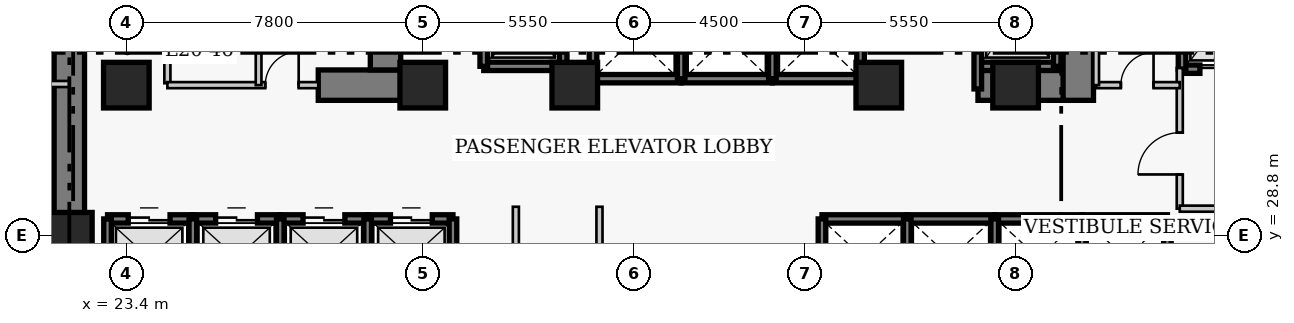
"""IFC4 building model, lengths in metres.
Left out: names, types, materials, properties, quantities, classifications, styles, units other than length and angle.
Written with IfcOpenShell. Run it as: python <this file> out.ifc"""

import sys

from ifc_helpers import new_model, si_unit, direction, frame, frame_2d, origin, origin_2d, place, context, subcontext, project, spatial, rectangle, extrude, element, fill, save


model = new_model("IFC4")
c1 = context("Model", 3, precision=1e-05, world=origin(), true_north=direction((0.0, 1.0)))
c2 = subcontext(c1, "Body", "Model", "MODEL_VIEW")
j1 = project(units=[si_unit("LENGTHUNIT", "METRE"), si_unit("PLANEANGLEUNIT", "RADIAN")], contexts=[c1])
p1 = place(None, origin())
s1 = spatial("IfcSite", under=j1, at=p1, CompositionType="ELEMENT")
p2 = place(p1, origin())
s2 = spatial("IfcBuilding", under=s1, at=p2, CompositionType="ELEMENT")
p3 = place(p2, frame((0.0, 0.0, 84.2)))
s3 = spatial("IfcBuildingStorey", under=s2, at=p3, CompositionType="ELEMENT", Elevation=84.2)
p4 = place(p3, frame((21.9, 27.05, 0.0), z_axis=(0.0, 0.0, 1.0), x_axis=(0.0, 1.0, 0.0)))
e1 = element("IfcWall", 1, at=p4, inside=s3, PredefinedType="SHEAR", context=c2, shape_type="SweptSolid", body=[
    extrude(rectangle(XDim=13.67, YDim=0.8, at=frame_2d((6.835, 0.0))), origin(), (0.0, 0.0, 1.0), 3.8),
])
p5 = place(p3, frame((28.45, 32.75, 0.0), z_axis=(0.0, 0.0, 1.0), x_axis=(1.0, 0.0, 0.0)))
e2 = element("IfcWall", 2, at=p5, inside=s3, PredefinedType="SHEAR", context=c2, shape_type="SweptSolid", body=[
    extrude(rectangle(XDim=2.4, YDim=0.8, at=frame_2d((1.2, 0.0))), origin(), (0.0, 0.0, 1.0), 3.8),
])
p6 = place(p3, frame((45.81, 32.75, 0.0), z_axis=(0.0, 0.0, 1.0), x_axis=(1.0, 0.0, 0.0)))
e3 = element("IfcWall", 3, at=p6, inside=s3, PredefinedType="SHEAR", context=c2, shape_type="SweptSolid", body=[
    extrude(rectangle(XDim=2.64, YDim=0.8, at=frame_2d((1.32, 0.0))), origin(), (0.0, 0.0, 1.0), 3.8),
])
p7 = place(p3, frame((30.22, 33.15, 0.0), z_axis=(0.0, 0.0, 1.0), x_axis=(0.0, 1.0, 0.0)))
e4 = element("IfcWall", 4, at=p7, inside=s3, PredefinedType="SHEAR", context=c2, shape_type="SweptSolid", body=[
    extrude(rectangle(XDim=7.17, YDim=0.8, at=frame_2d((3.585, 0.0))), origin(), (0.0, 0.0, 1.0), 3.8),
])
p8 = place(p3, frame((48.45, 32.35, 0.0), z_axis=(0.0, 0.0, 1.0), x_axis=(0.0, 1.0, 0.0)))
e5 = element("IfcWall", 5, at=p8, inside=s3, PredefinedType="SHEAR", context=c2, shape_type="SweptSolid", body=[
    extrude(rectangle(XDim=7.97, YDim=0.8, at=frame_2d((3.985, 0.0))), origin(), (0.0, 0.0, 1.0), 3.8),
])
p9 = place(p8, frame((5.85, 0.0, 0.0)))
e6 = element("IfcOpeningElement", 6, at=p9, cuts=e5, PredefinedType="OPENING", context=c2, shape_type="SweptSolid", body=[
    extrude(rectangle(XDim=1.1, YDim=2.15, at=frame_2d((0.55, 1.075))), frame((0.0, 0.41, 0.0), z_axis=(0.0, -1.0, 0.0), x_axis=(1.0, 0.0, 0.0)), (0.0, 0.0, 1.0), 0.82),
])
for number, where, z_axis, x_axis in (
    (7, (21.9, 28.8, 0.0), (0.0, 0.0, 1.0), (1.0, 0.0, 0.0)),
    (8, (23.4, 32.75, 0.0), (0.0, 0.0, 1.0), (1.0, 0.0, 0.0)),
    (9, (31.2, 32.75, 0.0), (0.0, 0.0, 1.0), (1.0, 0.0, 0.0)),
    (10, (35.2, 32.75, 0.0), (0.0, 0.0, 1.0), (1.0, 0.0, 0.0)),
    (11, (43.2, 32.75, 0.0), (0.0, 0.0, 1.0), (1.0, 0.0, 0.0)),
    (12, (46.8, 32.75, 0.0), (0.0, 0.0, 1.0), (1.0, 0.0, 0.0)),
):
    element("IfcColumn", number, at=place(p3, frame(where, z_axis=z_axis, x_axis=x_axis)), inside=s3, PredefinedType="COLUMN", context=c2, shape_type="SweptSolid", body=[
        extrude(rectangle(XDim=1.2, YDim=1.2, at=origin_2d()), origin(), (0.0, 0.0, 1.0), 3.8),
    ])
p10 = place(p3, frame((22.905, 29.23, 0.0), z_axis=(0.0, 0.0, 1.0), x_axis=(1.0, 0.0, 0.0)))
e13 = element("IfcWall", 13, at=p10, inside=s3, PredefinedType="SHEAR", context=c2, shape_type="SweptSolid", body=[
    extrude(rectangle(XDim=2.245, YDim=0.22, at=frame_2d((1.123, 0.0))), origin(), (0.0, 0.0, 1.0), 3.8),
])
p11 = place(p10, frame((0.545, 0.0, 0.0)))
e14 = element("IfcOpeningElement", 14, at=p11, cuts=e13, PredefinedType="OPENING", context=c2, shape_type="SweptSolid", body=[
    extrude(rectangle(XDim=1.1, YDim=2.15, at=frame_2d((0.55, 1.075))), frame((0.0, 0.12, 0.0), z_axis=(0.0, -1.0, 0.0), x_axis=(1.0, 0.0, 0.0)), (0.0, 0.0, 1.0), 0.24),
])
p12 = place(p3, frame((22.905, 27.17, 0.0), z_axis=(0.0, 0.0, 1.0), x_axis=(0.0, 1.0, 0.0)))
e15 = element("IfcWall", 15, at=p12, inside=s3, PredefinedType="SHEAR", context=c2, shape_type="SweptSolid", body=[
    extrude(rectangle(XDim=2.06, YDim=0.2, at=frame_2d((1.03, 0.0))), origin(), (0.0, 0.0, 1.0), 3.8),
])
p13 = place(p3, frame((25.15, 29.23, 0.0), z_axis=(0.0, 0.0, 1.0), x_axis=(1.0, 0.0, 0.0)))
e16 = element("IfcWall", 16, at=p13, inside=s3, PredefinedType="SHEAR", context=c2, shape_type="SweptSolid", body=[
    extrude(rectangle(XDim=2.3, YDim=0.22, at=frame_2d((1.15, 0.0))), origin(), (0.0, 0.0, 1.0), 3.8),
])
p14 = place(p13, frame((0.6, 0.0, 0.0)))
e17 = element("IfcOpeningElement", 17, at=p14, cuts=e16, PredefinedType="OPENING", context=c2, shape_type="SweptSolid", body=[
    extrude(rectangle(XDim=1.1, YDim=2.15, at=frame_2d((0.55, 1.075))), frame((0.0, 0.12, 0.0), z_axis=(0.0, -1.0, 0.0), x_axis=(1.0, 0.0, 0.0)), (0.0, 0.0, 1.0), 0.24),
])
p15 = place(p3, frame((25.15, 27.17, 0.0), z_axis=(0.0, 0.0, 1.0), x_axis=(0.0, 1.0, 0.0)))
e18 = element("IfcWall", 18, at=p15, inside=s3, PredefinedType="SHEAR", context=c2, shape_type="SweptSolid", body=[
    extrude(rectangle(XDim=2.06, YDim=0.2, at=frame_2d((1.03, 0.0))), origin(), (0.0, 0.0, 1.0), 3.8),
])
p16 = place(p3, frame((27.45, 29.23, 0.0), z_axis=(0.0, 0.0, 1.0), x_axis=(1.0, 0.0, 0.0)))
e19 = element("IfcWall", 19, at=p16, inside=s3, PredefinedType="SHEAR", context=c2, shape_type="SweptSolid", body=[
    extrude(rectangle(XDim=2.3, YDim=0.22, at=frame_2d((1.15, 0.0))), origin(), (0.0, 0.0, 1.0), 3.8),
])
p17 = place(p16, frame((0.6, 0.0, 0.0)))
e20 = element("IfcOpeningElement", 20, at=p17, cuts=e19, PredefinedType="OPENING", context=c2, shape_type="SweptSolid", body=[
    extrude(rectangle(XDim=1.1, YDim=2.15, at=frame_2d((0.55, 1.075))), frame((0.0, 0.12, 0.0), z_axis=(0.0, -1.0, 0.0), x_axis=(1.0, 0.0, 0.0)), (0.0, 0.0, 1.0), 0.24),
])
p18 = place(p3, frame((27.45, 27.17, 0.0), z_axis=(0.0, 0.0, 1.0), x_axis=(0.0, 1.0, 0.0)))
e21 = element("IfcWall", 21, at=p18, inside=s3, PredefinedType="SHEAR", context=c2, shape_type="SweptSolid", body=[
    extrude(rectangle(XDim=2.06, YDim=0.2, at=frame_2d((1.03, 0.0))), origin(), (0.0, 0.0, 1.0), 3.8),
])
p19 = place(p3, frame((29.75, 29.23, 0.0), z_axis=(0.0, 0.0, 1.0), x_axis=(1.0, 0.0, 0.0)))
e22 = element("IfcWall", 22, at=p19, inside=s3, PredefinedType="SHEAR", context=c2, shape_type="SweptSolid", body=[
    extrude(rectangle(XDim=2.245, YDim=0.22, at=frame_2d((1.123, 0.0))), origin(), (0.0, 0.0, 1.0), 3.8),
])
p20 = place(p19, frame((0.6, 0.0, 0.0)))
e23 = element("IfcOpeningElement", 23, at=p20, cuts=e22, PredefinedType="OPENING", context=c2, shape_type="SweptSolid", body=[
    extrude(rectangle(XDim=1.1, YDim=2.15, at=frame_2d((0.55, 1.075))), frame((0.0, 0.12, 0.0), z_axis=(0.0, -1.0, 0.0), x_axis=(1.0, 0.0, 0.0)), (0.0, 0.0, 1.0), 0.24),
])
for number, where, z_axis, x_axis in (
    (24, (29.75, 27.17, 0.0), (0.0, 0.0, 1.0), (0.0, 1.0, 0.0)),
    (25, (31.995, 27.17, 0.0), (0.0, 0.0, 1.0), (0.0, 1.0, 0.0)),
):
    element("IfcWall", number, at=place(p3, frame(where, z_axis=z_axis, x_axis=x_axis)), inside=s3, PredefinedType="SHEAR", context=c2, shape_type="SweptSolid", body=[
        extrude(rectangle(XDim=2.06, YDim=0.2, at=frame_2d((1.03, 0.0))), origin(), (0.0, 0.0, 1.0), 3.8),
    ])
p21 = place(p3, frame((41.705, 29.23, 0.0), z_axis=(0.0, 0.0, 1.0), x_axis=(1.0, 0.0, 0.0)))
e26 = element("IfcWall", 26, at=p21, inside=s3, PredefinedType="SHEAR", context=c2, shape_type="SweptSolid", body=[
    extrude(rectangle(XDim=2.245, YDim=0.22, at=frame_2d((1.123, 0.0))), origin(), (0.0, 0.0, 1.0), 3.8),
])
p22 = place(p3, frame((41.705, 27.17, 0.0), z_axis=(0.0, 0.0, 1.0), x_axis=(0.0, 1.0, 0.0)))
e27 = element("IfcWall", 27, at=p22, inside=s3, PredefinedType="SHEAR", context=c2, shape_type="SweptSolid", body=[
    extrude(rectangle(XDim=2.06, YDim=0.2, at=frame_2d((1.03, 0.0))), origin(), (0.0, 0.0, 1.0), 3.8),
])
p23 = place(p3, frame((43.95, 29.23, 0.0), z_axis=(0.0, 0.0, 1.0), x_axis=(1.0, 0.0, 0.0)))
e28 = element("IfcWall", 28, at=p23, inside=s3, PredefinedType="SHEAR", context=c2, shape_type="SweptSolid", body=[
    extrude(rectangle(XDim=2.3, YDim=0.22, at=frame_2d((1.15, 0.0))), origin(), (0.0, 0.0, 1.0), 3.8),
])
p24 = place(p3, frame((43.95, 27.17, 0.0), z_axis=(0.0, 0.0, 1.0), x_axis=(0.0, 1.0, 0.0)))
e29 = element("IfcWall", 29, at=p24, inside=s3, PredefinedType="SHEAR", context=c2, shape_type="SweptSolid", body=[
    extrude(rectangle(XDim=2.06, YDim=0.2, at=frame_2d((1.03, 0.0))), origin(), (0.0, 0.0, 1.0), 3.8),
])
p25 = place(p3, frame((46.25, 29.23, 0.0), z_axis=(0.0, 0.0, 1.0), x_axis=(1.0, 0.0, 0.0)))
e30 = element("IfcWall", 30, at=p25, inside=s3, PredefinedType="SHEAR", context=c2, shape_type="SweptSolid", body=[
    extrude(rectangle(XDim=2.3, YDim=0.22, at=frame_2d((1.15, 0.0))), origin(), (0.0, 0.0, 1.0), 3.8),
])
p26 = place(p3, frame((46.25, 27.17, 0.0), z_axis=(0.0, 0.0, 1.0), x_axis=(0.0, 1.0, 0.0)))
e31 = element("IfcWall", 31, at=p26, inside=s3, PredefinedType="SHEAR", context=c2, shape_type="SweptSolid", body=[
    extrude(rectangle(XDim=2.06, YDim=0.2, at=frame_2d((1.03, 0.0))), origin(), (0.0, 0.0, 1.0), 3.8),
])
p27 = place(p3, frame((48.55, 29.23, 0.0), z_axis=(0.0, 0.0, 1.0), x_axis=(1.0, 0.0, 0.0)))
e32 = element("IfcWall", 32, at=p27, inside=s3, PredefinedType="SHEAR", context=c2, shape_type="SweptSolid", body=[
    extrude(rectangle(XDim=2.245, YDim=0.22, at=frame_2d((1.123, 0.0))), origin(), (0.0, 0.0, 1.0), 3.8),
])
for number, where, z_axis, x_axis in (
    (33, (48.55, 27.17, 0.0), (0.0, 0.0, 1.0), (0.0, 1.0, 0.0)),
    (34, (50.795, 27.17, 0.0), (0.0, 0.0, 1.0), (0.0, 1.0, 0.0)),
):
    element("IfcWall", number, at=place(p3, frame(where, z_axis=z_axis, x_axis=x_axis)), inside=s3, PredefinedType="SHEAR", context=c2, shape_type="SweptSolid", body=[
        extrude(rectangle(XDim=2.06, YDim=0.2, at=frame_2d((1.03, 0.0))), origin(), (0.0, 0.0, 1.0), 3.8),
    ])
p28 = place(p3, frame((35.68, 32.92, 0.0), z_axis=(0.0, 0.0, 1.0), x_axis=(1.0, 0.0, 0.0)))
e35 = element("IfcWall", 35, at=p28, inside=s3, PredefinedType="SHEAR", context=c2, shape_type="SweptSolid", body=[
    extrude(rectangle(XDim=2.32, YDim=0.22, at=frame_2d((1.16, 0.0))), origin(), (0.0, 0.0, 1.0), 3.8),
])
p29 = place(p3, frame((35.68, 32.92, 0.0), z_axis=(0.0, 0.0, 1.0), x_axis=(0.0, 1.0, 0.0)))
e36 = element("IfcWall", 36, at=p29, inside=s3, PredefinedType="SHEAR", context=c2, shape_type="SweptSolid", body=[
    extrude(rectangle(XDim=2.16, YDim=0.2, at=frame_2d((1.08, 0.0))), origin(), (0.0, 0.0, 1.0), 3.8),
])
p30 = place(p3, frame((38.0, 32.92, 0.0), z_axis=(0.0, 0.0, 1.0), x_axis=(1.0, 0.0, 0.0)))
e37 = element("IfcWall", 37, at=p30, inside=s3, PredefinedType="SHEAR", context=c2, shape_type="SweptSolid", body=[
    extrude(rectangle(XDim=2.4, YDim=0.22, at=frame_2d((1.2, 0.0))), origin(), (0.0, 0.0, 1.0), 3.8),
])
p31 = place(p3, frame((38.0, 32.92, 0.0), z_axis=(0.0, 0.0, 1.0), x_axis=(0.0, 1.0, 0.0)))
e38 = element("IfcWall", 38, at=p31, inside=s3, PredefinedType="SHEAR", context=c2, shape_type="SweptSolid", body=[
    extrude(rectangle(XDim=2.16, YDim=0.2, at=frame_2d((1.08, 0.0))), origin(), (0.0, 0.0, 1.0), 3.8),
])
p32 = place(p3, frame((40.4, 32.92, 0.0), z_axis=(0.0, 0.0, 1.0), x_axis=(1.0, 0.0, 0.0)))
e39 = element("IfcWall", 39, at=p32, inside=s3, PredefinedType="SHEAR", context=c2, shape_type="SweptSolid", body=[
    extrude(rectangle(XDim=2.32, YDim=0.22, at=frame_2d((1.16, 0.0))), origin(), (0.0, 0.0, 1.0), 3.8),
])
for number, where, z_axis, x_axis in (
    (40, (40.4, 32.92, 0.0), (0.0, 0.0, 1.0), (0.0, 1.0, 0.0)),
    (41, (42.72, 32.92, 0.0), (0.0, 0.0, 1.0), (0.0, 1.0, 0.0)),
):
    element("IfcWall", number, at=place(p3, frame(where, z_axis=z_axis, x_axis=x_axis)), inside=s3, PredefinedType="SHEAR", context=c2, shape_type="SweptSolid", body=[
        extrude(rectangle(XDim=2.16, YDim=0.2, at=frame_2d((1.08, 0.0))), origin(), (0.0, 0.0, 1.0), 3.8),
    ])
p33 = place(p3, frame((51.18, 33.17, 0.0), z_axis=(0.0, 0.0, 1.0), x_axis=(1.0, 0.0, 0.0)))
e42 = element("IfcWall", 42, at=p33, inside=s3, PredefinedType="SHEAR", context=c2, shape_type="SweptSolid", body=[
    extrude(rectangle(XDim=2.42, YDim=0.22, at=frame_2d((1.21, 0.0))), origin(), (0.0, 0.0, 1.0), 3.8),
])
p34 = place(p33, frame((0.47, 0.0, 0.0)))
e43 = element("IfcOpeningElement", 43, at=p34, cuts=e42, PredefinedType="OPENING", context=c2, shape_type="SweptSolid", body=[
    extrude(rectangle(XDim=1.3, YDim=2.15, at=frame_2d((0.65, 1.075))), frame((0.0, 0.12, 0.0), z_axis=(0.0, -1.0, 0.0), x_axis=(1.0, 0.0, 0.0)), (0.0, 0.0, 1.0), 0.24),
])
p35 = place(p3, frame((51.18, 33.17, 0.0), z_axis=(0.0, 0.0, 1.0), x_axis=(0.0, 1.0, 0.0)))
e44 = element("IfcWall", 44, at=p35, inside=s3, PredefinedType="SHEAR", context=c2, shape_type="SweptSolid", body=[
    extrude(rectangle(XDim=2.86, YDim=0.2, at=frame_2d((1.43, 0.0))), origin(), (0.0, 0.0, 1.0), 3.8),
])
p36 = place(p3, frame((32.805, 33.245, 0.0), z_axis=(0.0, 0.0, 1.0), x_axis=(1.0, 0.0, 0.0)))
e45 = element("IfcWall", 45, at=p36, inside=s3, PredefinedType="SHEAR", context=c2, shape_type="SweptSolid", body=[
    extrude(rectangle(XDim=2.09, YDim=0.22, at=frame_2d((1.045, 0.0))), origin(), (0.0, 0.0, 1.0), 3.8),
])
for number, where, z_axis, x_axis in (
    (46, (32.805, 33.245, 0.0), (0.0, 0.0, 1.0), (0.0, 1.0, 0.0)),
    (47, (34.895, 33.245, 0.0), (0.0, 0.0, 1.0), (0.0, 1.0, 0.0)),
):
    element("IfcWall", number, at=place(p3, frame(where, z_axis=z_axis, x_axis=x_axis)), inside=s3, PredefinedType="SHEAR", context=c2, shape_type="SweptSolid", body=[
        extrude(rectangle(XDim=2.91, YDim=0.2, at=frame_2d((1.455, 0.0))), origin(), (0.0, 0.0, 1.0), 3.8),
    ])
p37 = place(p3, frame((45.805, 33.245, 0.0), z_axis=(0.0, 0.0, 1.0), x_axis=(1.0, 0.0, 0.0)))
e48 = element("IfcWall", 48, at=p37, inside=s3, PredefinedType="SHEAR", context=c2, shape_type="SweptSolid", body=[
    extrude(rectangle(XDim=2.09, YDim=0.22, at=frame_2d((1.045, 0.0))), origin(), (0.0, 0.0, 1.0), 3.8),
])
p38 = place(p3, frame((45.805, 32.65, 0.0), z_axis=(0.0, 0.0, 1.0), x_axis=(0.0, 1.0, 0.0)))
e49 = element("IfcWall", 49, at=p38, inside=s3, PredefinedType="SHEAR", context=c2, shape_type="SweptSolid", body=[
    extrude(rectangle(XDim=3.505, YDim=0.2, at=frame_2d((1.752, 0.0))), origin(), (0.0, 0.0, 1.0), 3.8),
])
p39 = place(p3, frame((47.895, 33.245, 0.0), z_axis=(0.0, 0.0, 1.0), x_axis=(0.0, 1.0, 0.0)))
e50 = element("IfcWall", 50, at=p39, inside=s3, PredefinedType="SHEAR", context=c2, shape_type="SweptSolid", body=[
    extrude(rectangle(XDim=2.91, YDim=0.2, at=frame_2d((1.455, 0.0))), origin(), (0.0, 0.0, 1.0), 3.8),
])
p40 = place(p3, frame((24.48, 32.8, 0.0), z_axis=(0.0, 0.0, 1.0), x_axis=(0.0, 1.0, 0.0)))
e51 = element("IfcWall", 51, at=p40, inside=s3, PredefinedType="PARTITIONING", context=c2, shape_type="SweptSolid", body=[
    extrude(rectangle(XDim=3.57, YDim=0.16, at=frame_2d((1.785, 0.0))), origin(), (0.0, 0.0, 1.0), 3.54),
])
p41 = place(p40, frame((1.604, 0.0, 0.0)))
e52 = element("IfcOpeningElement", 52, at=p41, cuts=e51, PredefinedType="OPENING", context=c2, shape_type="SweptSolid", body=[
    extrude(rectangle(XDim=0.9, YDim=2.1, at=frame_2d((0.45, 1.05))), frame((0.0, 0.09, 0.0), z_axis=(0.0, -1.0, 0.0), x_axis=(1.0, 0.0, 0.0)), (0.0, 0.0, 1.0), 0.18),
])
p42 = place(p3, frame((51.12, 29.5, 0.0), z_axis=(0.0, 0.0, 1.0), x_axis=(0.0, 1.0, 0.0)))
e53 = element("IfcWall", 53, at=p42, inside=s3, PredefinedType="PARTITIONING", context=c2, shape_type="SweptSolid", body=[
    extrude(rectangle(XDim=3.7, YDim=0.16, at=frame_2d((1.85, 0.0))), origin(), (0.0, 0.0, 1.0), 3.54),
])
p43 = place(p42, frame((0.9, 0.0, 0.0)))
e54 = element("IfcOpeningElement", 54, at=p43, cuts=e53, PredefinedType="OPENING", context=c2, shape_type="SweptSolid", body=[
    extrude(rectangle(XDim=1.1, YDim=2.15, at=frame_2d((0.55, 1.075))), frame((0.0, 0.09, 0.0), z_axis=(0.0, -1.0, 0.0), x_axis=(1.0, 0.0, 0.0)), (0.0, 0.0, 1.0), 0.18),
])
p44 = place(p3, frame((51.12, 29.5, 0.0), z_axis=(0.0, 0.0, 1.0), x_axis=(1.0, 0.0, 0.0)))
e55 = element("IfcWall", 55, at=p44, inside=s3, PredefinedType="PARTITIONING", context=c2, shape_type="SweptSolid", body=[
    extrude(rectangle(XDim=5.63, YDim=0.16, at=frame_2d((2.815, 0.0))), origin(), (0.0, 0.0, 1.0), 3.54),
])
p45 = place(p3, frame((24.48, 32.75, 0.0), z_axis=(0.0, 0.0, 1.0), x_axis=(1.0, 0.0, 0.0)))
e56 = element("IfcWall", 56, at=p45, inside=s3, PredefinedType="PARTITIONING", context=c2, shape_type="SweptSolid", body=[
    extrude(rectangle(XDim=3.97, YDim=0.16, at=frame_2d((1.985, 0.0))), origin(), (0.0, 0.0, 1.0), 3.54),
])
p46 = place(p45, frame((2.575, 0.0, 0.0)))
e57 = element("IfcOpeningElement", 57, at=p46, cuts=e56, PredefinedType="OPENING", context=c2, shape_type="SweptSolid", body=[
    extrude(rectangle(XDim=0.88, YDim=2.05, at=frame_2d((0.44, 1.025))), frame((0.0, 0.09, 0.0), z_axis=(0.0, -1.0, 0.0), x_axis=(1.0, 0.0, 0.0)), (0.0, 0.0, 1.0), 0.18),
])
p47 = place(p3, frame((48.92, 32.75, 0.0), z_axis=(0.0, 0.0, 1.0), x_axis=(1.0, 0.0, 0.0)))
e58 = element("IfcWall", 58, at=p47, inside=s3, PredefinedType="PARTITIONING", context=c2, shape_type="SweptSolid", body=[
    extrude(rectangle(XDim=2.2, YDim=0.16, at=frame_2d((1.1, 0.0))), origin(), (0.0, 0.0, 1.0), 3.54),
])
p48 = place(p47, frame((0.65, 0.0, 0.0)))
e59 = element("IfcOpeningElement", 59, at=p48, cuts=e58, PredefinedType="OPENING", context=c2, shape_type="SweptSolid", body=[
    extrude(rectangle(XDim=0.86, YDim=2.05, at=frame_2d((0.43, 1.025))), frame((0.0, 0.09, 0.0), z_axis=(0.0, -1.0, 0.0), x_axis=(1.0, 0.0, 0.0)), (0.0, 0.0, 1.0), 0.18),
])
for number, where, z_axis, x_axis in (
    (60, (48.92, 32.75, 0.0), (0.0, 0.0, 1.0), (0.0, 1.0, 0.0)),
    (61, (26.88, 32.75, 0.0), (0.0, 0.0, 1.0), (0.0, 1.0, 0.0)),
):
    element("IfcWall", number, at=place(p3, frame(where, z_axis=z_axis, x_axis=x_axis)), inside=s3, PredefinedType="PARTITIONING", context=c2, shape_type="SweptSolid", body=[
        extrude(rectangle(XDim=3.62, YDim=0.15, at=frame_2d((1.81, 0.0))), origin(), (0.0, 0.0, 1.0), 3.54),
    ])
for number, where, z_axis, x_axis in (
    (62, (33.65, 24.91, 0.0), (0.0, 0.0, 1.0), (0.0, 1.0, 0.0)),
    (63, (35.85, 24.91, 0.0), (0.0, 0.0, 1.0), (0.0, 1.0, 0.0)),
):
    element("IfcWall", number, at=place(p3, frame(where, z_axis=z_axis, x_axis=x_axis)), inside=s3, PredefinedType="PARTITIONING", context=c2, shape_type="SweptSolid", body=[
        extrude(rectangle(XDim=4.64, YDim=0.16, at=frame_2d((2.32, 0.0))), origin(), (0.0, 0.0, 1.0), 3.54),
    ])
p49 = place(p3, frame((19.16, 32.78, 0.0), z_axis=(0.0, 0.0, 1.0), x_axis=(1.0, 0.0, 0.0)))
e64 = element("IfcWall", 64, at=p49, inside=s3, PredefinedType="PARTITIONING", context=c2, shape_type="SweptSolid", body=[
    extrude(rectangle(XDim=2.74, YDim=0.16, at=frame_2d((1.37, 0.0))), origin(), (0.0, 0.0, 1.0), 3.54),
])
p50 = place(p11, origin())
e65 = element("IfcDoor", 65, at=p50, inside=s3, OperationType="DOUBLE_DOOR_SLIDING", PredefinedType="DOOR", context=c2, shape_type="SweptSolid", body=[
    extrude(rectangle(XDim=1.1, YDim=2.15, at=frame_2d((0.55, 1.075))), frame((0.0, 0.025, 0.0), z_axis=(0.0, -1.0, 0.0), x_axis=(1.0, 0.0, 0.0)), (0.0, 0.0, 1.0), 0.05),
])
fill(e14, e65)
p51 = place(p14, origin())
e66 = element("IfcDoor", 66, at=p51, inside=s3, OperationType="DOUBLE_DOOR_SLIDING", PredefinedType="DOOR", context=c2, shape_type="SweptSolid", body=[
    extrude(rectangle(XDim=1.1, YDim=2.15, at=frame_2d((0.55, 1.075))), frame((0.0, 0.025, 0.0), z_axis=(0.0, -1.0, 0.0), x_axis=(1.0, 0.0, 0.0)), (0.0, 0.0, 1.0), 0.05),
])
fill(e17, e66)
p52 = place(p17, origin())
e67 = element("IfcDoor", 67, at=p52, inside=s3, OperationType="DOUBLE_DOOR_SLIDING", PredefinedType="DOOR", context=c2, shape_type="SweptSolid", body=[
    extrude(rectangle(XDim=1.1, YDim=2.15, at=frame_2d((0.55, 1.075))), frame((0.0, 0.025, 0.0), z_axis=(0.0, -1.0, 0.0), x_axis=(1.0, 0.0, 0.0)), (0.0, 0.0, 1.0), 0.05),
])
fill(e20, e67)
p53 = place(p20, origin())
e68 = element("IfcDoor", 68, at=p53, inside=s3, OperationType="DOUBLE_DOOR_SLIDING", PredefinedType="DOOR", context=c2, shape_type="SweptSolid", body=[
    extrude(rectangle(XDim=1.1, YDim=2.15, at=frame_2d((0.55, 1.075))), frame((0.0, 0.025, 0.0), z_axis=(0.0, -1.0, 0.0), x_axis=(1.0, 0.0, 0.0)), (0.0, 0.0, 1.0), 0.05),
])
fill(e23, e68)
p54 = place(p34, origin())
e69 = element("IfcDoor", 69, at=p54, inside=s3, OperationType="DOUBLE_DOOR_SLIDING", PredefinedType="DOOR", context=c2, shape_type="SweptSolid", body=[
    extrude(rectangle(XDim=1.3, YDim=2.15, at=frame_2d((0.65, 1.075))), frame((0.0, 0.025, 0.0), z_axis=(0.0, -1.0, 0.0), x_axis=(1.0, 0.0, 0.0)), (0.0, 0.0, 1.0), 0.05),
])
fill(e43, e69)
p55 = place(p43, origin())
e70 = element("IfcDoor", 70, at=p55, inside=s3, OperationType="SINGLE_SWING_LEFT", PredefinedType="DOOR", context=c2, shape_type="SweptSolid", body=[
    extrude(rectangle(XDim=1.1, YDim=2.15, at=frame_2d((0.55, 1.075))), frame((0.0, 0.025, 0.0), z_axis=(0.0, -1.0, 0.0), x_axis=(1.0, 0.0, 0.0)), (0.0, 0.0, 1.0), 0.05),
])
fill(e54, e70)
p56 = place(p46, origin())
e71 = element("IfcDoor", 71, at=p56, inside=s3, OperationType="SINGLE_SWING_RIGHT", PredefinedType="DOOR", context=c2, shape_type="SweptSolid", body=[
    extrude(rectangle(XDim=0.88, YDim=2.05, at=frame_2d((0.44, 1.025))), frame((0.0, 0.025, 0.0), z_axis=(0.0, -1.0, 0.0), x_axis=(1.0, 0.0, 0.0)), (0.0, 0.0, 1.0), 0.05),
])
fill(e57, e71)
p57 = place(p48, origin())
e72 = element("IfcDoor", 72, at=p57, inside=s3, OperationType="SINGLE_SWING_RIGHT", PredefinedType="DOOR", context=c2, shape_type="SweptSolid", body=[
    extrude(rectangle(XDim=0.86, YDim=2.05, at=frame_2d((0.43, 1.025))), frame((0.0, 0.025, 0.0), z_axis=(0.0, -1.0, 0.0), x_axis=(1.0, 0.0, 0.0)), (0.0, 0.0, 1.0), 0.05),
])
fill(e59, e72)
save(model, sys.argv[1])
